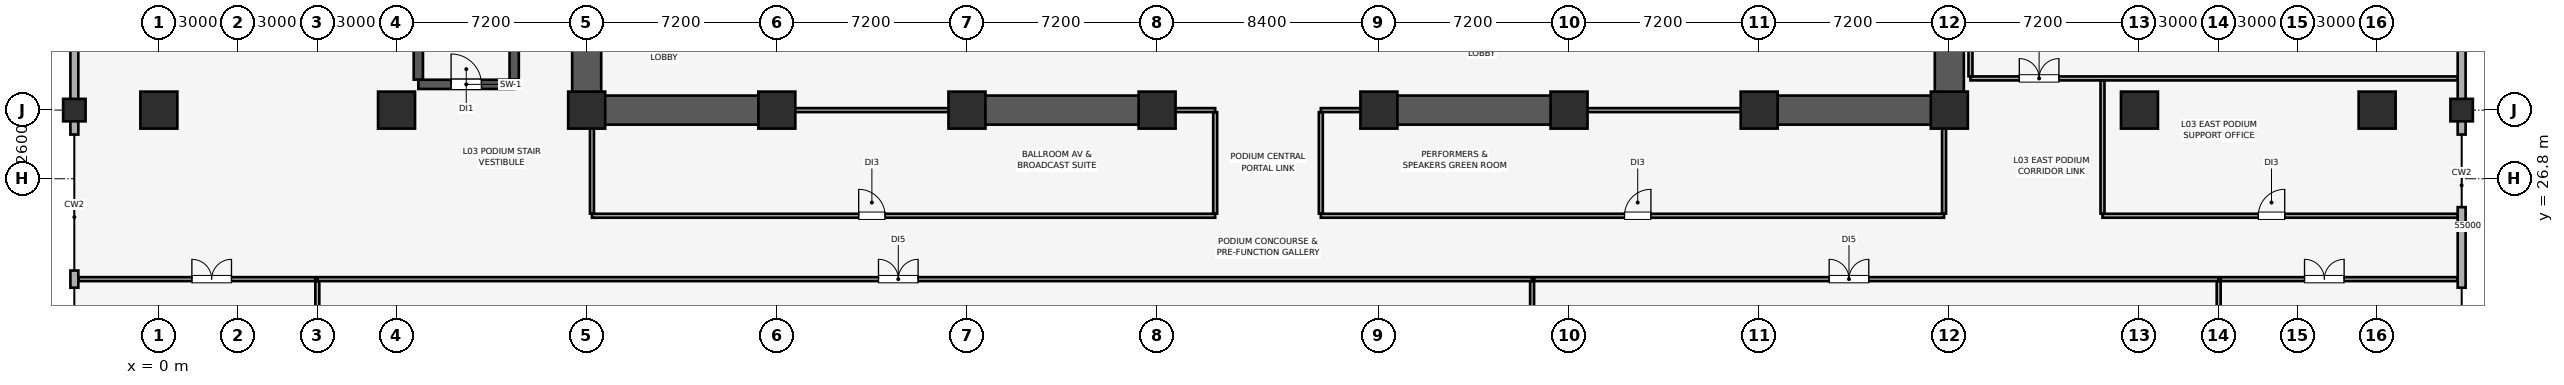
"""IFC4 building model, lengths in metres.
Left out: names, types, materials, properties, quantities, classifications, styles, units other than length and angle.
Written with IfcOpenShell. Run it as: python <this file> out.ifc"""

import sys

from ifc_helpers import new_model, si_unit, direction, frame, frame_2d, origin, origin_2d, place, context, subcontext, project, spatial, rectangle, extrude, element, fill, save


model = new_model("IFC4")
c1 = context("Model", 3, precision=1e-05, world=origin(), true_north=direction((0.0, 1.0)))
c2 = subcontext(c1, "Body", "Model", "MODEL_VIEW")
j1 = project(units=[si_unit("LENGTHUNIT", "METRE"), si_unit("PLANEANGLEUNIT", "RADIAN")], contexts=[c1])
p1 = place(None, origin())
s1 = spatial("IfcSite", under=j1, at=p1, CompositionType="ELEMENT")
p2 = place(p1, origin())
s2 = spatial("IfcBuilding", under=s1, at=p2, CompositionType="ELEMENT")
p3 = place(p2, frame((0.0, 0.0, 19.4)))
s3 = spatial("IfcBuildingStorey", under=s2, at=p3, CompositionType="ELEMENT", Elevation=19.4)
for number, where, z_axis, x_axis in (
    (1, (-3.2, 29.4, 0.0), (0.0, 0.0, 1.0), (1.0, 0.0, 0.0)),
    (2, (87.2, 29.4, 0.0), (0.0, 0.0, 1.0), (1.0, 0.0, 0.0)),
):
    element("IfcColumn", number, at=place(p3, frame(where, z_axis=z_axis, x_axis=x_axis)), inside=s3, PredefinedType="COLUMN", context=c2, shape_type="SweptSolid", body=[
        extrude(rectangle(XDim=0.85, YDim=0.85, at=origin_2d()), origin(), (0.0, 0.0, 1.0), 6.28),
    ])
for number, where, z_axis, x_axis in (
    (3, (9.0, 29.4, 0.0), (0.0, 0.0, 1.0), (1.0, 0.0, 0.0)),
    (4, (16.2, 29.4, 0.0), (0.0, 0.0, 1.0), (1.0, 0.0, 0.0)),
    (5, (23.4, 29.4, 0.0), (0.0, 0.0, 1.0), (1.0, 0.0, 0.0)),
    (6, (30.6, 29.4, 0.0), (0.0, 0.0, 1.0), (1.0, 0.0, 0.0)),
    (7, (37.8, 29.4, 0.0), (0.0, 0.0, 1.0), (1.0, 0.0, 0.0)),
    (8, (46.2, 29.4, 0.0), (0.0, 0.0, 1.0), (1.0, 0.0, 0.0)),
    (9, (53.4, 29.4, 0.0), (0.0, 0.0, 1.0), (1.0, 0.0, 0.0)),
    (10, (60.6, 29.4, 0.0), (0.0, 0.0, 1.0), (1.0, 0.0, 0.0)),
    (11, (67.8, 29.4, 0.0), (0.0, 0.0, 1.0), (1.0, 0.0, 0.0)),
    (12, (75.0, 29.4, 0.0), (0.0, 0.0, 1.0), (1.0, 0.0, 0.0)),
    (13, (0.0, 29.4, 0.0), (0.0, 0.0, 1.0), (1.0, 0.0, 0.0)),
    (14, (84.0, 29.4, 0.0), (0.0, 0.0, 1.0), (1.0, 0.0, 0.0)),
):
    element("IfcColumn", number, at=place(p3, frame(where, z_axis=z_axis, x_axis=x_axis)), inside=s3, PredefinedType="COLUMN", context=c2, shape_type="SweptSolid", body=[
        extrude(rectangle(XDim=1.4, YDim=1.4, at=origin_2d()), origin(), (0.0, 0.0, 1.0), 6.28),
    ])
p4 = place(p3, frame((87.2, 22.675, 0.0), z_axis=(0.0, 0.0, 1.0), x_axis=(0.0, 1.0, 0.0)))
e15 = element("IfcWall", 15, at=p4, inside=s3, PredefinedType="SOLIDWALL", context=c2, shape_type="SweptSolid", body=[
    extrude(rectangle(XDim=3.05, YDim=0.3, at=frame_2d((1.525, 0.0))), origin(), (0.0, 0.0, 1.0), 5.33),
])
p5 = place(p3, frame((87.2, 28.475, 0.0), z_axis=(0.0, 0.0, 1.0), x_axis=(0.0, 1.0, 0.0)))
e16 = element("IfcWall", 16, at=p5, inside=s3, PredefinedType="SOLIDWALL", context=c2, shape_type="SweptSolid", body=[
    extrude(rectangle(XDim=20.425, YDim=0.3, at=frame_2d((10.212, 0.0))), origin(), (0.0, 0.0, 1.0), 5.33),
])
p6 = place(p5, frame((4.525, 0.0, 0.85)))
e17 = element("IfcOpeningElement", 17, at=p6, cuts=e16, PredefinedType="OPENING", context=c2, shape_type="SweptSolid", body=[
    extrude(rectangle(XDim=3.8, YDim=2.2, at=frame_2d((1.9, 1.1))), frame((0.0, 0.16, 0.0), z_axis=(0.0, -1.0, 0.0), x_axis=(1.0, 0.0, 0.0)), (0.0, 0.0, 1.0), 0.32),
])
p7 = place(p5, frame((12.425, 0.0, 0.85)))
e18 = element("IfcOpeningElement", 18, at=p7, cuts=e16, PredefinedType="OPENING", context=c2, shape_type="SweptSolid", body=[
    extrude(rectangle(XDim=3.8, YDim=2.2, at=frame_2d((1.9, 1.1))), frame((0.0, 0.16, 0.0), z_axis=(0.0, -1.0, 0.0), x_axis=(1.0, 0.0, 0.0)), (0.0, 0.0, 1.0), 0.32),
])
p8 = place(p3, frame((-3.2, 48.9, 0.0), z_axis=(0.0, 0.0, 1.0), x_axis=(0.0, -1.0, 0.0)))
e19 = element("IfcWall", 19, at=p8, inside=s3, PredefinedType="SOLIDWALL", context=c2, shape_type="SweptSolid", body=[
    extrude(rectangle(XDim=20.425, YDim=0.3, at=frame_2d((10.212, 0.0))), origin(), (0.0, 0.0, 1.0), 5.33),
])
p9 = place(p8, frame((12.5, 0.0, 0.85)))
e20 = element("IfcOpeningElement", 20, at=p9, cuts=e19, PredefinedType="OPENING", context=c2, shape_type="SweptSolid", body=[
    extrude(rectangle(XDim=3.8, YDim=2.2, at=frame_2d((1.9, 1.1))), frame((0.0, 0.16, 0.0), z_axis=(0.0, -1.0, 0.0), x_axis=(1.0, 0.0, 0.0)), (0.0, 0.0, 1.0), 0.32),
])
p10 = place(p8, frame((4.2, 0.0, 0.85)))
e21 = element("IfcOpeningElement", 21, at=p10, cuts=e19, PredefinedType="OPENING", context=c2, shape_type="SweptSolid", body=[
    extrude(rectangle(XDim=3.8, YDim=2.2, at=frame_2d((1.9, 1.1))), frame((0.0, 0.16, 0.0), z_axis=(0.0, -1.0, 0.0), x_axis=(1.0, 0.0, 0.0)), (0.0, 0.0, 1.0), 0.32),
])
p11 = place(p3, frame((-3.2, 23.325, 0.0), z_axis=(0.0, 0.0, 1.0), x_axis=(0.0, -1.0, 0.0)))
e22 = element("IfcWall", 22, at=p11, inside=s3, PredefinedType="SOLIDWALL", context=c2, shape_type="SweptSolid", body=[
    extrude(rectangle(XDim=0.65, YDim=0.3, at=frame_2d((0.325, 0.0))), origin(), (0.0, 0.0, 1.0), 5.33),
])
for number, where, z_axis, x_axis in (
    (23, (16.2, 29.4, 0.0), (0.0, 0.0, 1.0), (0.0, 1.0, 0.0)),
    (24, (67.8, 29.4, 0.0), (0.0, 0.0, 1.0), (0.0, 1.0, 0.0)),
):
    element("IfcWall", number, at=place(p3, frame(where, z_axis=z_axis, x_axis=x_axis)), inside=s3, PredefinedType="SHEAR", context=c2, shape_type="SweptSolid", body=[
        extrude(rectangle(XDim=19.2, YDim=1.1, at=frame_2d((9.6, 0.0))), origin(), (0.0, 0.0, 1.0), 6.28),
    ])
p12 = place(p3, frame((16.755, 29.4, 0.0), z_axis=(0.0, 0.0, 1.0), x_axis=(1.0, 0.0, 0.0)))
e25 = element("IfcWall", 25, at=p12, inside=s3, PredefinedType="SHEAR", context=c2, shape_type="SweptSolid", body=[
    extrude(rectangle(XDim=6.845, YDim=1.1, at=frame_2d((3.423, 0.0))), origin(), (0.0, 0.0, 1.0), 6.28),
])
for number, where, z_axis, x_axis in (
    (26, (30.4, 29.4, 0.0), (0.0, 0.0, 1.0), (1.0, 0.0, 0.0)),
    (27, (46.0, 29.4, 0.0), (0.0, 0.0, 1.0), (1.0, 0.0, 0.0)),
):
    element("IfcWall", number, at=place(p3, frame(where, z_axis=z_axis, x_axis=x_axis)), inside=s3, PredefinedType="SHEAR", context=c2, shape_type="SweptSolid", body=[
        extrude(rectangle(XDim=7.6, YDim=1.1, at=frame_2d((3.8, 0.0))), origin(), (0.0, 0.0, 1.0), 6.28),
    ])
p13 = place(p3, frame((60.4, 29.4, 0.0), z_axis=(0.0, 0.0, 1.0), x_axis=(1.0, 0.0, 0.0)))
e28 = element("IfcWall", 28, at=p13, inside=s3, PredefinedType="SHEAR", context=c2, shape_type="SweptSolid", body=[
    extrude(rectangle(XDim=6.845, YDim=1.1, at=frame_2d((3.423, 0.0))), origin(), (0.0, 0.0, 1.0), 6.28),
])
p14 = place(p3, frame((9.825, 30.375, 0.0), z_axis=(0.0, 0.0, 1.0), x_axis=(1.0, 0.0, 0.0)))
e29 = element("IfcWall", 29, at=p14, inside=s3, PredefinedType="SHEAR", context=c2, shape_type="SweptSolid", body=[
    extrude(rectangle(XDim=3.63, YDim=0.35, at=frame_2d((1.815, 0.0))), origin(), (0.0, 0.0, 1.0), 6.28),
])
p15 = place(p14, frame((1.24, 0.0, 0.0)))
e30 = element("IfcOpeningElement", 30, at=p15, cuts=e29, PredefinedType="OPENING", context=c2, shape_type="SweptSolid", body=[
    extrude(rectangle(XDim=1.15, YDim=2.15, at=frame_2d((0.575, 1.075))), frame((0.0, 0.185, 0.0), z_axis=(0.0, -1.0, 0.0), x_axis=(1.0, 0.0, 0.0)), (0.0, 0.0, 1.0), 0.37),
])
for number, where, z_axis, x_axis in (
    (31, (9.825, 30.555, 0.0), (0.0, 0.0, 1.0), (0.0, 1.0, 0.0)),
    (32, (13.455, 30.555, 0.0), (0.0, 0.0, 1.0), (0.0, 1.0, 0.0)),
):
    element("IfcWall", number, at=place(p3, frame(where, z_axis=z_axis, x_axis=x_axis)), inside=s3, PredefinedType="SHEAR", context=c2, shape_type="SweptSolid", body=[
        extrude(rectangle(XDim=8.44, YDim=0.35, at=frame_2d((4.22, 0.0))), origin(), (0.0, 0.0, 1.0), 6.28),
    ])
p16 = place(p3, frame((68.6, 30.6, 0.0), z_axis=(0.0, 0.0, 1.0), x_axis=(1.0, 0.0, 0.0)))
e33 = element("IfcWall", 33, at=p16, inside=s3, PredefinedType="PARTITIONING", context=c2, shape_type="SweptSolid", body=[
    extrude(rectangle(XDim=18.445, YDim=0.15, at=frame_2d((9.222, 0.0))), origin(), (0.0, 0.0, 1.0), 6.28),
])
p17 = place(p16, frame((1.85, 0.0, 0.0)))
e34 = element("IfcOpeningElement", 34, at=p17, cuts=e33, PredefinedType="OPENING", context=c2, shape_type="SweptSolid", body=[
    extrude(rectangle(XDim=1.5, YDim=2.25, at=frame_2d((0.75, 1.125))), frame((0.0, 0.085, 0.0), z_axis=(0.0, -1.0, 0.0), x_axis=(1.0, 0.0, 0.0)), (0.0, 0.0, 1.0), 0.17),
])
p18 = place(p3, frame((68.6, 30.68, 0.0), z_axis=(0.0, 0.0, 1.0), x_axis=(0.0, 1.0, 0.0)))
e35 = element("IfcWall", 35, at=p18, inside=s3, PredefinedType="PARTITIONING", context=c2, shape_type="SweptSolid", body=[
    extrude(rectangle(XDim=21.665, YDim=0.15, at=frame_2d((10.833, 0.0))), origin(), (0.0, 0.0, 1.0), 6.28),
])
p19 = place(p3, frame((73.6, 25.4, 0.0), z_axis=(0.0, 0.0, 1.0), x_axis=(1.0, 0.0, 0.0)))
e36 = element("IfcWall", 36, at=p19, inside=s3, PredefinedType="PARTITIONING", context=c2, shape_type="SweptSolid", body=[
    extrude(rectangle(XDim=13.445, YDim=0.15, at=frame_2d((6.722, 0.0))), origin(), (0.0, 0.0, 1.0), 6.28),
])
p20 = place(p19, frame((5.9, 0.0, 0.0)))
e37 = element("IfcOpeningElement", 37, at=p20, cuts=e36, PredefinedType="OPENING", context=c2, shape_type="SweptSolid", body=[
    extrude(rectangle(XDim=1.0, YDim=2.15, at=frame_2d((0.5, 1.075))), frame((0.0, 0.085, 0.0), z_axis=(0.0, -1.0, 0.0), x_axis=(1.0, 0.0, 0.0)), (0.0, 0.0, 1.0), 0.17),
])
p21 = place(p3, frame((73.6, 25.48, 0.0), z_axis=(0.0, 0.0, 1.0), x_axis=(0.0, 1.0, 0.0)))
e38 = element("IfcWall", 38, at=p21, inside=s3, PredefinedType="PARTITIONING", context=c2, shape_type="SweptSolid", body=[
    extrude(rectangle(XDim=5.04, YDim=0.15, at=frame_2d((2.52, 0.0))), origin(), (0.0, 0.0, 1.0), 6.28),
])
p22 = place(p3, frame((6.0, 23.0, 0.0), z_axis=(0.0, 0.0, 1.0), x_axis=(1.0, 0.0, 0.0)))
e39 = element("IfcWall", 39, at=p22, inside=s3, PredefinedType="PARTITIONING", context=c2, shape_type="SweptSolid", body=[
    extrude(rectangle(XDim=46.0, YDim=0.15, at=frame_2d((23.0, 0.0))), origin(), (0.0, 0.0, 1.0), 6.28),
])
p23 = place(p22, frame((21.25, 0.0, 0.0)))
e40 = element("IfcOpeningElement", 40, at=p23, cuts=e39, PredefinedType="OPENING", context=c2, shape_type="SweptSolid", body=[
    extrude(rectangle(XDim=1.5, YDim=2.25, at=frame_2d((0.75, 1.125))), frame((0.0, 0.085, 0.0), z_axis=(0.0, -1.0, 0.0), x_axis=(1.0, 0.0, 0.0)), (0.0, 0.0, 1.0), 0.17),
])
for number, where, z_axis, x_axis in (
    (41, (6.0, -2.345, 0.0), (0.0, 0.0, 1.0), (0.0, 1.0, 0.0)),
    (42, (52.0, -2.345, 0.0), (0.0, 0.0, 1.0), (0.0, 1.0, 0.0)),
):
    element("IfcWall", number, at=place(p3, frame(where, z_axis=z_axis, x_axis=x_axis)), inside=s3, PredefinedType="PARTITIONING", context=c2, shape_type="SweptSolid", body=[
        extrude(rectangle(XDim=25.265, YDim=0.15, at=frame_2d((12.632, 0.0))), origin(), (0.0, 0.0, 1.0), 6.28),
    ])
p24 = place(p3, frame((52.08, 23.0, 0.0), z_axis=(0.0, 0.0, 1.0), x_axis=(1.0, 0.0, 0.0)))
e43 = element("IfcWall", 43, at=p24, inside=s3, PredefinedType="PARTITIONING", context=c2, shape_type="SweptSolid", body=[
    extrude(rectangle(XDim=25.92, YDim=0.15, at=frame_2d((12.96, 0.0))), origin(), (0.0, 0.0, 1.0), 6.28),
])
p25 = place(p24, frame((11.17, 0.0, 0.0)))
e44 = element("IfcOpeningElement", 44, at=p25, cuts=e43, PredefinedType="OPENING", context=c2, shape_type="SweptSolid", body=[
    extrude(rectangle(XDim=1.5, YDim=2.25, at=frame_2d((0.75, 1.125))), frame((0.0, 0.085, 0.0), z_axis=(0.0, -1.0, 0.0), x_axis=(1.0, 0.0, 0.0)), (0.0, 0.0, 1.0), 0.17),
])
p26 = place(p3, frame((78.0, -2.345, 0.0), z_axis=(0.0, 0.0, 1.0), x_axis=(0.0, 1.0, 0.0)))
e45 = element("IfcWall", 45, at=p26, inside=s3, PredefinedType="PARTITIONING", context=c2, shape_type="SweptSolid", body=[
    extrude(rectangle(XDim=25.265, YDim=0.15, at=frame_2d((12.632, 0.0))), origin(), (0.0, 0.0, 1.0), 6.28),
])
p27 = place(p3, frame((-3.045, 23.0, 0.0), z_axis=(0.0, 0.0, 1.0), x_axis=(1.0, 0.0, 0.0)))
e46 = element("IfcWall", 46, at=p27, inside=s3, PredefinedType="PARTITIONING", context=c2, shape_type="SweptSolid", body=[
    extrude(rectangle(XDim=8.965, YDim=0.15, at=frame_2d((4.482, 0.0))), origin(), (0.0, 0.0, 1.0), 6.28),
])
p28 = place(p27, frame((4.295, 0.0, 0.0)))
e47 = element("IfcOpeningElement", 47, at=p28, cuts=e46, PredefinedType="OPENING", context=c2, shape_type="SweptSolid", body=[
    extrude(rectangle(XDim=1.5, YDim=2.25, at=frame_2d((0.75, 1.125))), frame((0.0, 0.085, 0.0), z_axis=(0.0, -1.0, 0.0), x_axis=(1.0, 0.0, 0.0)), (0.0, 0.0, 1.0), 0.17),
])
p29 = place(p3, frame((78.08, 23.0, 0.0), z_axis=(0.0, 0.0, 1.0), x_axis=(1.0, 0.0, 0.0)))
e48 = element("IfcWall", 48, at=p29, inside=s3, PredefinedType="PARTITIONING", context=c2, shape_type="SweptSolid", body=[
    extrude(rectangle(XDim=8.965, YDim=0.15, at=frame_2d((4.482, 0.0))), origin(), (0.0, 0.0, 1.0), 6.28),
])
p30 = place(p29, frame((3.17, 0.0, 0.0)))
e49 = element("IfcOpeningElement", 49, at=p30, cuts=e48, PredefinedType="OPENING", context=c2, shape_type="SweptSolid", body=[
    extrude(rectangle(XDim=1.5, YDim=2.25, at=frame_2d((0.75, 1.125))), frame((0.0, 0.085, 0.0), z_axis=(0.0, -1.0, 0.0), x_axis=(1.0, 0.0, 0.0)), (0.0, 0.0, 1.0), 0.17),
])
p31 = place(p3, frame((16.4, 25.4, 0.0), z_axis=(0.0, 0.0, 1.0), x_axis=(1.0, 0.0, 0.0)))
e50 = element("IfcWall", 50, at=p31, inside=s3, PredefinedType="PARTITIONING", context=c2, shape_type="SweptSolid", body=[
    extrude(rectangle(XDim=23.6, YDim=0.15, at=frame_2d((11.8, 0.0))), origin(), (0.0, 0.0, 1.0), 6.28),
])
p32 = place(p31, frame((10.1, 0.0, 0.0)))
e51 = element("IfcOpeningElement", 51, at=p32, cuts=e50, PredefinedType="OPENING", context=c2, shape_type="SweptSolid", body=[
    extrude(rectangle(XDim=1.0, YDim=2.15, at=frame_2d((0.5, 1.075))), frame((0.0, 0.085, 0.0), z_axis=(0.0, -1.0, 0.0), x_axis=(1.0, 0.0, 0.0)), (0.0, 0.0, 1.0), 0.17),
])
p33 = place(p3, frame((23.61, 29.4, 0.0), z_axis=(0.0, 0.0, 1.0), x_axis=(1.0, 0.0, 0.0)))
e52 = element("IfcWall", 52, at=p33, inside=s3, PredefinedType="PARTITIONING", context=c2, shape_type="SweptSolid", body=[
    extrude(rectangle(XDim=6.78, YDim=0.15, at=frame_2d((3.39, 0.0))), origin(), (0.0, 0.0, 1.0), 5.18),
])
p34 = place(p3, frame((38.01, 29.4, 0.0), z_axis=(0.0, 0.0, 1.0), x_axis=(1.0, 0.0, 0.0)))
e53 = element("IfcWall", 53, at=p34, inside=s3, PredefinedType="PARTITIONING", context=c2, shape_type="SweptSolid", body=[
    extrude(rectangle(XDim=1.99, YDim=0.15, at=frame_2d((0.995, 0.0))), origin(), (0.0, 0.0, 1.0), 5.18),
])
p35 = place(p3, frame((16.4, 25.48, 0.0), z_axis=(0.0, 0.0, 1.0), x_axis=(0.0, 1.0, 0.0)))
e54 = element("IfcWall", 54, at=p35, inside=s3, PredefinedType="PARTITIONING", context=c2, shape_type="SweptSolid", body=[
    extrude(rectangle(XDim=3.91, YDim=0.15, at=frame_2d((1.955, 0.0))), origin(), (0.0, 0.0, 1.0), 5.68),
])
p36 = place(p3, frame((40.0, 25.48, 0.0), z_axis=(0.0, 0.0, 1.0), x_axis=(0.0, 1.0, 0.0)))
e55 = element("IfcWall", 55, at=p36, inside=s3, PredefinedType="PARTITIONING", context=c2, shape_type="SweptSolid", body=[
    extrude(rectangle(XDim=3.84, YDim=0.15, at=frame_2d((1.92, 0.0))), origin(), (0.0, 0.0, 1.0), 6.28),
])
p37 = place(p3, frame((44.0, 25.4, 0.0), z_axis=(0.0, 0.0, 1.0), x_axis=(1.0, 0.0, 0.0)))
e56 = element("IfcWall", 56, at=p37, inside=s3, PredefinedType="PARTITIONING", context=c2, shape_type="SweptSolid", body=[
    extrude(rectangle(XDim=23.6, YDim=0.15, at=frame_2d((11.8, 0.0))), origin(), (0.0, 0.0, 1.0), 6.28),
])
p38 = place(p37, frame((11.5, 0.0, 0.0)))
e57 = element("IfcOpeningElement", 57, at=p38, cuts=e56, PredefinedType="OPENING", context=c2, shape_type="SweptSolid", body=[
    extrude(rectangle(XDim=1.0, YDim=2.15, at=frame_2d((0.5, 1.075))), frame((0.0, 0.085, 0.0), z_axis=(0.0, -1.0, 0.0), x_axis=(1.0, 0.0, 0.0)), (0.0, 0.0, 1.0), 0.17),
])
p39 = place(p3, frame((44.0, 29.4, 0.0), z_axis=(0.0, 0.0, 1.0), x_axis=(1.0, 0.0, 0.0)))
e58 = element("IfcWall", 58, at=p39, inside=s3, PredefinedType="PARTITIONING", context=c2, shape_type="SweptSolid", body=[
    extrude(rectangle(XDim=1.99, YDim=0.15, at=frame_2d((0.995, 0.0))), origin(), (0.0, 0.0, 1.0), 5.18),
])
p40 = place(p3, frame((53.61, 29.4, 0.0), z_axis=(0.0, 0.0, 1.0), x_axis=(1.0, 0.0, 0.0)))
e59 = element("IfcWall", 59, at=p40, inside=s3, PredefinedType="PARTITIONING", context=c2, shape_type="SweptSolid", body=[
    extrude(rectangle(XDim=6.78, YDim=0.15, at=frame_2d((3.39, 0.0))), origin(), (0.0, 0.0, 1.0), 5.18),
])
p41 = place(p3, frame((44.0, 25.48, 0.0), z_axis=(0.0, 0.0, 1.0), x_axis=(0.0, 1.0, 0.0)))
e60 = element("IfcWall", 60, at=p41, inside=s3, PredefinedType="PARTITIONING", context=c2, shape_type="SweptSolid", body=[
    extrude(rectangle(XDim=3.84, YDim=0.15, at=frame_2d((1.92, 0.0))), origin(), (0.0, 0.0, 1.0), 6.28),
])
p42 = place(p3, frame((67.6, 25.48, 0.0), z_axis=(0.0, 0.0, 1.0), x_axis=(0.0, 1.0, 0.0)))
e61 = element("IfcWall", 61, at=p42, inside=s3, PredefinedType="PARTITIONING", context=c2, shape_type="SweptSolid", body=[
    extrude(rectangle(XDim=3.91, YDim=0.15, at=frame_2d((1.955, 0.0))), origin(), (0.0, 0.0, 1.0), 5.68),
])
p43 = place(p15, origin())
e62 = element("IfcDoor", 62, at=p43, inside=s3, OperationType="SINGLE_SWING_LEFT", PredefinedType="DOOR", context=c2, shape_type="SweptSolid", body=[
    extrude(rectangle(XDim=1.15, YDim=2.15, at=frame_2d((0.575, 1.075))), frame((0.0, 0.025, 0.0), z_axis=(0.0, -1.0, 0.0), x_axis=(1.0, 0.0, 0.0)), (0.0, 0.0, 1.0), 0.05),
])
fill(e30, e62)
p44 = place(p17, origin())
e63 = element("IfcDoor", 63, at=p44, inside=s3, OperationType="DOUBLE_DOOR_SINGLE_SWING", PredefinedType="DOOR", context=c2, shape_type="SweptSolid", body=[
    extrude(rectangle(XDim=1.5, YDim=2.25, at=frame_2d((0.75, 1.125))), frame((0.0, 0.025, 0.0), z_axis=(0.0, -1.0, 0.0), x_axis=(1.0, 0.0, 0.0)), (0.0, 0.0, 1.0), 0.05),
])
fill(e34, e63)
p45 = place(p20, origin())
e64 = element("IfcDoor", 64, at=p45, inside=s3, OperationType="SINGLE_SWING_RIGHT", PredefinedType="DOOR", context=c2, shape_type="SweptSolid", body=[
    extrude(rectangle(XDim=1.0, YDim=2.15, at=frame_2d((0.5, 1.075))), frame((0.0, 0.025, 0.0), z_axis=(0.0, -1.0, 0.0), x_axis=(1.0, 0.0, 0.0)), (0.0, 0.0, 1.0), 0.05),
])
fill(e37, e64)
p46 = place(p23, origin())
e65 = element("IfcDoor", 65, at=p46, inside=s3, OperationType="DOUBLE_DOOR_SINGLE_SWING", PredefinedType="DOOR", context=c2, shape_type="SweptSolid", body=[
    extrude(rectangle(XDim=1.5, YDim=2.25, at=frame_2d((0.75, 1.125))), frame((0.0, 0.025, 0.0), z_axis=(0.0, -1.0, 0.0), x_axis=(1.0, 0.0, 0.0)), (0.0, 0.0, 1.0), 0.05),
])
fill(e40, e65)
p47 = place(p25, origin())
e66 = element("IfcDoor", 66, at=p47, inside=s3, OperationType="DOUBLE_DOOR_SINGLE_SWING", PredefinedType="DOOR", context=c2, shape_type="SweptSolid", body=[
    extrude(rectangle(XDim=1.5, YDim=2.25, at=frame_2d((0.75, 1.125))), frame((0.0, 0.025, 0.0), z_axis=(0.0, -1.0, 0.0), x_axis=(1.0, 0.0, 0.0)), (0.0, 0.0, 1.0), 0.05),
])
fill(e44, e66)
p48 = place(p28, origin())
e67 = element("IfcDoor", 67, at=p48, inside=s3, OperationType="DOUBLE_DOOR_SINGLE_SWING", PredefinedType="DOOR", context=c2, shape_type="SweptSolid", body=[
    extrude(rectangle(XDim=1.5, YDim=2.25, at=frame_2d((0.75, 1.125))), frame((0.0, 0.025, 0.0), z_axis=(0.0, -1.0, 0.0), x_axis=(1.0, 0.0, 0.0)), (0.0, 0.0, 1.0), 0.05),
])
fill(e47, e67)
p49 = place(p30, origin())
e68 = element("IfcDoor", 68, at=p49, inside=s3, OperationType="DOUBLE_DOOR_SINGLE_SWING", PredefinedType="DOOR", context=c2, shape_type="SweptSolid", body=[
    extrude(rectangle(XDim=1.5, YDim=2.25, at=frame_2d((0.75, 1.125))), frame((0.0, 0.025, 0.0), z_axis=(0.0, -1.0, 0.0), x_axis=(1.0, 0.0, 0.0)), (0.0, 0.0, 1.0), 0.05),
])
fill(e49, e68)
p50 = place(p32, origin())
e69 = element("IfcDoor", 69, at=p50, inside=s3, OperationType="SINGLE_SWING_LEFT", PredefinedType="DOOR", context=c2, shape_type="SweptSolid", body=[
    extrude(rectangle(XDim=1.0, YDim=2.15, at=frame_2d((0.5, 1.075))), frame((0.0, 0.025, 0.0), z_axis=(0.0, -1.0, 0.0), x_axis=(1.0, 0.0, 0.0)), (0.0, 0.0, 1.0), 0.05),
])
fill(e51, e69)
p51 = place(p38, origin())
e70 = element("IfcDoor", 70, at=p51, inside=s3, OperationType="SINGLE_SWING_RIGHT", PredefinedType="DOOR", context=c2, shape_type="SweptSolid", body=[
    extrude(rectangle(XDim=1.0, YDim=2.15, at=frame_2d((0.5, 1.075))), frame((0.0, 0.025, 0.0), z_axis=(0.0, -1.0, 0.0), x_axis=(1.0, 0.0, 0.0)), (0.0, 0.0, 1.0), 0.05),
])
fill(e57, e70)
save(model, sys.argv[1])
